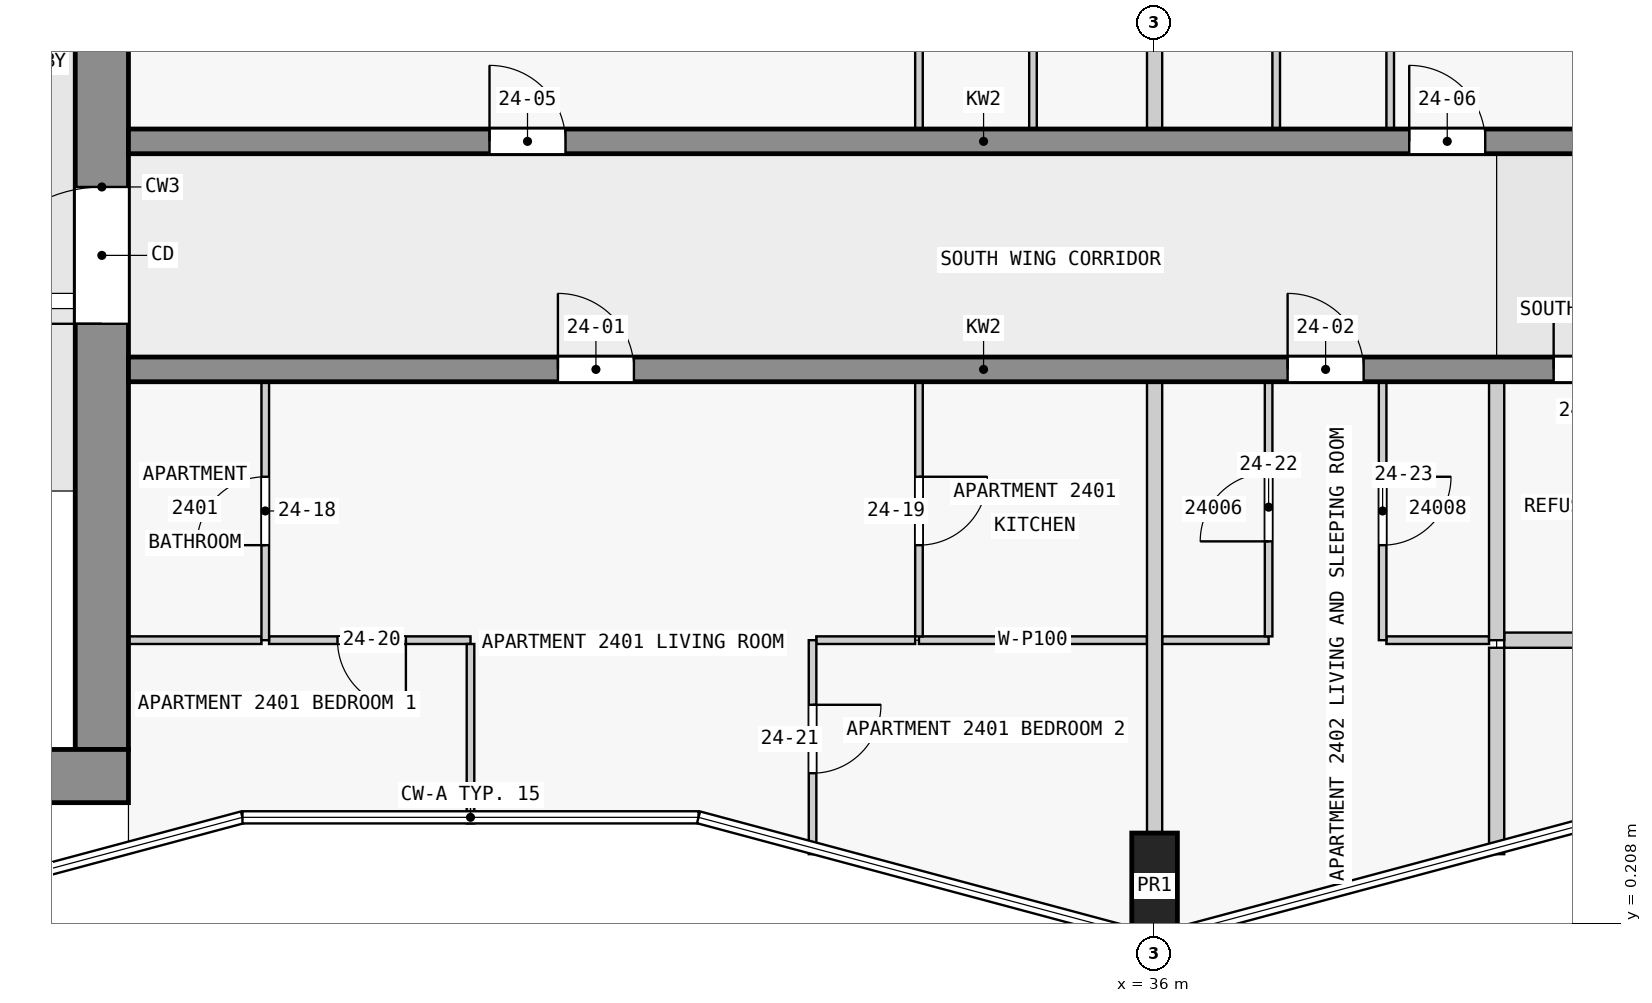
"""IFC4 building model, lengths in metres.
Left out: names, types, materials, properties, quantities, classifications, styles, units other than length and angle.
Written with IfcOpenShell. Run it as: python <this file> out.ifc"""

import sys

from ifc_helpers import new_model, si_unit, direction, frame, frame_2d, origin, origin_2d, place, context, subcontext, project, spatial, rectangle, extrude, element, fill, save


model = new_model("IFC4")
c1 = context("Model", 3, precision=1e-05, world=origin(), true_north=direction((0.0, 1.0)))
c2 = subcontext(c1, "Body", "Model", "MODEL_VIEW")
j1 = project(units=[si_unit("LENGTHUNIT", "METRE"), si_unit("PLANEANGLEUNIT", "RADIAN")], contexts=[c1])
p1 = place(None, origin())
s1 = spatial("IfcSite", under=j1, at=p1, CompositionType="ELEMENT")
p2 = place(p1, origin())
s2 = spatial("IfcBuilding", under=s1, at=p2, CompositionType="ELEMENT")
p3 = place(p2, frame((0.0, 0.0, 95.8)))
s3 = spatial("IfcBuildingStorey", under=s2, at=p3, CompositionType="ELEMENT", Elevation=95.8)
p4 = place(p3, frame((36.0, 0.7, 0.0), z_axis=(0.0, 0.0, 1.0), x_axis=(1.0, 0.0, 0.0)))
e1 = element("IfcColumn", 1, at=p4, inside=s3, PredefinedType="COLUMN", context=c2, shape_type="SweptSolid", body=[
    extrude(rectangle(XDim=0.6, YDim=1.4, at=origin_2d()), origin(), (0.0, 0.0, 1.0), 3.5),
])
p5 = place(p3, frame((1.6, 2.15, 0.0), z_axis=(0.0, 0.0, 1.0), x_axis=(1.0, 0.0, 0.0)))
e2 = element("IfcWall", 2, at=p5, inside=s3, PredefinedType="SHEAR", context=c2, shape_type="SweptSolid", body=[
    extrude(rectangle(XDim=20.9, YDim=0.7, at=frame_2d((10.45, 0.0))), origin(), (0.0, 0.0, 1.0), 3.25),
])
p6 = place(p3, frame((22.15, 2.5, 0.0), z_axis=(0.0, 0.0, 1.0), x_axis=(0.0, 1.0, 0.0)))
e3 = element("IfcWall", 3, at=p6, inside=s3, PredefinedType="SHEAR", context=c2, shape_type="SweptSolid", body=[
    extrude(rectangle(XDim=14.8, YDim=0.7, at=frame_2d((7.4, 0.0))), origin(), (0.0, 0.0, 1.0), 3.25),
])
p7 = place(p6, frame((5.6, 0.0, 0.0)))
e4 = element("IfcOpeningElement", 4, at=p7, cuts=e3, PredefinedType="OPENING", context=c2, shape_type="SweptSolid", body=[
    extrude(rectangle(XDim=1.8, YDim=2.1, at=frame_2d((0.9, 1.05))), frame((0.0, 0.36, 0.0), z_axis=(0.0, -1.0, 0.0), x_axis=(1.0, 0.0, 0.0)), (0.0, 0.0, 1.0), 0.72),
])
p8 = place(p3, frame((22.5, 7.5, 0.0), z_axis=(0.0, 0.0, 1.0), x_axis=(1.0, 0.0, 0.0)))
e5 = element("IfcWall", 5, at=p8, inside=s3, PredefinedType="SHEAR", context=c2, shape_type="SweptSolid", body=[
    extrude(rectangle(XDim=22.5, YDim=0.325, at=frame_2d((11.25, 0.0))), origin(), (0.0, 0.0, 1.0), 3.25),
])
p9 = place(p8, frame((5.65, 0.0, 0.0)))
e6 = element("IfcOpeningElement", 6, at=p9, cuts=e5, PredefinedType="OPENING", context=c2, shape_type="SweptSolid", body=[
    extrude(rectangle(XDim=1.0, YDim=2.1, at=frame_2d((0.5, 1.05))), frame((0.0, 0.172, 0.0), z_axis=(0.0, -1.0, 0.0), x_axis=(1.0, 0.0, 0.0)), (0.0, 0.0, 1.0), 0.345),
])
p10 = place(p8, frame((15.25, 0.0, 0.0)))
e7 = element("IfcOpeningElement", 7, at=p10, cuts=e5, PredefinedType="OPENING", context=c2, shape_type="SweptSolid", body=[
    extrude(rectangle(XDim=1.0, YDim=2.1, at=frame_2d((0.5, 1.05))), frame((0.0, 0.172, 0.0), z_axis=(0.0, -1.0, 0.0), x_axis=(1.0, 0.0, 0.0)), (0.0, 0.0, 1.0), 0.345),
])
p11 = place(p8, frame((18.75, 0.0, 0.0)))
e8 = element("IfcOpeningElement", 8, at=p11, cuts=e5, PredefinedType="OPENING", context=c2, shape_type="SweptSolid", body=[
    extrude(rectangle(XDim=0.9, YDim=2.1, at=frame_2d((0.45, 1.05))), frame((0.0, 0.172, 0.0), z_axis=(0.0, -1.0, 0.0), x_axis=(1.0, 0.0, 0.0)), (0.0, 0.0, 1.0), 0.345),
])
p12 = place(p8, frame((20.95, 0.0, 0.0)))
e9 = element("IfcOpeningElement", 9, at=p12, cuts=e5, PredefinedType="OPENING", context=c2, shape_type="SweptSolid", body=[
    extrude(rectangle(XDim=1.0, YDim=2.1, at=frame_2d((0.5, 1.05))), frame((0.0, 0.172, 0.0), z_axis=(0.0, -1.0, 0.0), x_axis=(1.0, 0.0, 0.0)), (0.0, 0.0, 1.0), 0.345),
])
p13 = place(p3, frame((22.5, 10.5, 0.0), z_axis=(0.0, 0.0, 1.0), x_axis=(1.0, 0.0, 0.0)))
e10 = element("IfcWall", 10, at=p13, inside=s3, PredefinedType="SHEAR", context=c2, shape_type="SweptSolid", body=[
    extrude(rectangle(XDim=22.5, YDim=0.325, at=frame_2d((11.25, 0.0))), origin(), (0.0, 0.0, 1.0), 3.25),
])
p14 = place(p13, frame((4.75, 0.0, 0.0)))
e11 = element("IfcOpeningElement", 11, at=p14, cuts=e10, PredefinedType="OPENING", context=c2, shape_type="SweptSolid", body=[
    extrude(rectangle(XDim=1.0, YDim=2.1, at=frame_2d((0.5, 1.05))), frame((0.0, 0.172, 0.0), z_axis=(0.0, -1.0, 0.0), x_axis=(1.0, 0.0, 0.0)), (0.0, 0.0, 1.0), 0.345),
])
p15 = place(p13, frame((16.85, 0.0, 0.0)))
e12 = element("IfcOpeningElement", 12, at=p15, cuts=e10, PredefinedType="OPENING", context=c2, shape_type="SweptSolid", body=[
    extrude(rectangle(XDim=1.0, YDim=2.1, at=frame_2d((0.5, 1.05))), frame((0.0, 0.172, 0.0), z_axis=(0.0, -1.0, 0.0), x_axis=(1.0, 0.0, 0.0)), (0.0, 0.0, 1.0), 0.345),
])
p16 = place(p3, frame((27.0, 3.938, 0.0), z_axis=(0.0, 0.0, 1.0), x_axis=(-1.0, 0.0, 0.0)))
e13 = element("IfcWall", 13, at=p16, inside=s3, PredefinedType="PARTITIONING", context=c2, shape_type="SweptSolid", body=[
    extrude(rectangle(XDim=2.65, YDim=0.1, at=frame_2d((1.325, 0.0))), origin(), (0.0, 0.0, 1.0), 3.25),
])
p17 = place(p16, frame((0.85, 0.0, 0.0)))
e14 = element("IfcOpeningElement", 14, at=p17, cuts=e13, PredefinedType="OPENING", context=c2, shape_type="SweptSolid", body=[
    extrude(rectangle(XDim=0.9, YDim=2.1, at=frame_2d((0.45, 1.05))), frame((0.0, 0.06, 0.0), z_axis=(0.0, -1.0, 0.0), x_axis=(1.0, 0.0, 0.0)), (0.0, 0.0, 1.0), 0.12),
])
p18 = place(p3, frame((32.85, 3.938, 0.0), z_axis=(0.0, 0.0, 1.0), x_axis=(-1.0, 0.0, 0.0)))
e15 = element("IfcWall", 15, at=p18, inside=s3, PredefinedType="PARTITIONING", context=c2, shape_type="SweptSolid", body=[
    extrude(rectangle(XDim=1.3, YDim=0.1, at=frame_2d((0.65, 0.0))), origin(), (0.0, 0.0, 1.0), 3.25),
])
p19 = place(p3, frame((22.5, 3.938, 0.0), z_axis=(0.0, 0.0, 1.0), x_axis=(1.0, 0.0, 0.0)))
e16 = element("IfcWall", 16, at=p19, inside=s3, PredefinedType="PARTITIONING", context=c2, shape_type="SweptSolid", body=[
    extrude(rectangle(XDim=1.75, YDim=0.1, at=frame_2d((0.875, 0.0))), origin(), (0.0, 0.0, 1.0), 3.25),
])
p20 = place(p3, frame((32.9, 3.938, 0.0), z_axis=(0.0, 0.0, 1.0), x_axis=(1.0, 0.0, 0.0)))
e17 = element("IfcWall", 17, at=p20, inside=s3, PredefinedType="PARTITIONING", context=c2, shape_type="SweptSolid", body=[
    extrude(rectangle(XDim=3.0, YDim=0.1, at=frame_2d((1.5, 0.0))), origin(), (0.0, 0.0, 1.0), 3.25),
])
p21 = place(p3, frame((36.1, 3.938, 0.0), z_axis=(0.0, 0.0, 1.0), x_axis=(1.0, 0.0, 0.0)))
e18 = element("IfcWall", 18, at=p21, inside=s3, PredefinedType="PARTITIONING", context=c2, shape_type="SweptSolid", body=[
    extrude(rectangle(XDim=1.4, YDim=0.1, at=frame_2d((0.7, 0.0))), origin(), (0.0, 0.0, 1.0), 3.25),
])
p22 = place(p3, frame((39.05, 3.938, 0.0), z_axis=(0.0, 0.0, 1.0), x_axis=(1.0, 0.0, 0.0)))
e19 = element("IfcWall", 19, at=p22, inside=s3, PredefinedType="PARTITIONING", context=c2, shape_type="SweptSolid", body=[
    extrude(rectangle(XDim=1.35, YDim=0.1, at=frame_2d((0.675, 0.0))), origin(), (0.0, 0.0, 1.0), 3.25),
])
p23 = place(p3, frame((40.6, 3.938, 0.0), z_axis=(0.0, 0.0, 1.0), x_axis=(1.0, 0.0, 0.0)))
e20 = element("IfcWall", 20, at=p23, inside=s3, PredefinedType="PARTITIONING", context=c2, shape_type="SweptSolid", body=[
    extrude(rectangle(XDim=2.2, YDim=0.2, at=frame_2d((1.1, 0.0))), origin(), (0.0, 0.0, 1.0), 3.25),
])
p24 = place(p3, frame((24.3, 3.938, 0.0), z_axis=(0.0, 0.0, 1.0), x_axis=(0.0, 1.0, 0.0)))
e21 = element("IfcWall", 21, at=p24, inside=s3, PredefinedType="PARTITIONING", context=c2, shape_type="SweptSolid", body=[
    extrude(rectangle(XDim=3.4, YDim=0.1, at=frame_2d((1.7, 0.0))), origin(), (0.0, 0.0, 1.0), 3.25),
])
p25 = place(p24, frame((1.25, 0.0, 0.0)))
e22 = element("IfcOpeningElement", 22, at=p25, cuts=e21, PredefinedType="OPENING", context=c2, shape_type="SweptSolid", body=[
    extrude(rectangle(XDim=0.9, YDim=2.1, at=frame_2d((0.45, 1.05))), frame((0.0, 0.06, 0.0), z_axis=(0.0, -1.0, 0.0), x_axis=(1.0, 0.0, 0.0)), (0.0, 0.0, 1.0), 0.12),
])
p26 = place(p3, frame((27.0, 1.527, 0.0), z_axis=(0.0, 0.0, 1.0), x_axis=(0.0, 1.0, 0.0)))
e23 = element("IfcWall", 23, at=p26, inside=s3, PredefinedType="PARTITIONING", context=c2, shape_type="SweptSolid", body=[
    extrude(rectangle(XDim=2.361, YDim=0.1, at=frame_2d((1.18, 0.0))), origin(), (0.0, 0.0, 1.0), 3.25),
])
p27 = place(p3, frame((31.5, 3.938, 0.0), z_axis=(0.0, 0.0, 1.0), x_axis=(0.0, -1.0, 0.0)))
e24 = element("IfcWall", 24, at=p27, inside=s3, PredefinedType="PARTITIONING", context=c2, shape_type="SweptSolid", body=[
    extrude(rectangle(XDim=2.815, YDim=0.1, at=frame_2d((1.408, 0.0))), origin(), (0.0, 0.0, 1.0), 3.25),
])
p28 = place(p27, frame((0.85, 0.0, 0.0)))
e25 = element("IfcOpeningElement", 25, at=p28, cuts=e24, PredefinedType="OPENING", context=c2, shape_type="SweptSolid", body=[
    extrude(rectangle(XDim=0.9, YDim=2.1, at=frame_2d((0.45, 1.05))), frame((0.0, 0.06, 0.0), z_axis=(0.0, -1.0, 0.0), x_axis=(1.0, 0.0, 0.0)), (0.0, 0.0, 1.0), 0.12),
])
p29 = place(p3, frame((32.9, 7.337, 0.0), z_axis=(0.0, 0.0, 1.0), x_axis=(0.0, -1.0, 0.0)))
e26 = element("IfcWall", 26, at=p29, inside=s3, PredefinedType="PARTITIONING", context=c2, shape_type="SweptSolid", body=[
    extrude(rectangle(XDim=3.35, YDim=0.1, at=frame_2d((1.675, 0.0))), origin(), (0.0, 0.0, 1.0), 3.25),
])
p30 = place(p29, frame((1.25, 0.0, 0.0)))
e27 = element("IfcOpeningElement", 27, at=p30, cuts=e26, PredefinedType="OPENING", context=c2, shape_type="SweptSolid", body=[
    extrude(rectangle(XDim=0.9, YDim=2.1, at=frame_2d((0.45, 1.05))), frame((0.0, 0.06, 0.0), z_axis=(0.0, -1.0, 0.0), x_axis=(1.0, 0.0, 0.0)), (0.0, 0.0, 1.0), 0.12),
])
p31 = place(p3, frame((32.9, 14.012, 0.0), z_axis=(0.0, 0.0, 1.0), x_axis=(0.0, -1.0, 0.0)))
e28 = element("IfcWall", 28, at=p31, inside=s3, PredefinedType="PARTITIONING", context=c2, shape_type="SweptSolid", body=[
    extrude(rectangle(XDim=3.35, YDim=0.1, at=frame_2d((1.675, 0.0))), origin(), (0.0, 0.0, 1.0), 3.25),
])
p32 = place(p31, frame((1.25, 0.0, 0.0)))
e29 = element("IfcOpeningElement", 29, at=p32, cuts=e28, PredefinedType="OPENING", context=c2, shape_type="SweptSolid", body=[
    extrude(rectangle(XDim=0.9, YDim=2.1, at=frame_2d((0.45, 1.05))), frame((0.0, 0.06, 0.0), z_axis=(0.0, -1.0, 0.0), x_axis=(1.0, 0.0, 0.0)), (0.0, 0.0, 1.0), 0.12),
])
p33 = place(p3, frame((34.4, 10.663, 0.0), z_axis=(0.0, 0.0, 1.0), x_axis=(0.0, 1.0, 0.0)))
e30 = element("IfcWall", 30, at=p33, inside=s3, PredefinedType="PARTITIONING", context=c2, shape_type="SweptSolid", body=[
    extrude(rectangle(XDim=3.35, YDim=0.1, at=frame_2d((1.675, 0.0))), origin(), (0.0, 0.0, 1.0), 3.25),
])
p34 = place(p3, frame((36.0, 1.4, 0.0), z_axis=(0.0, 0.0, 1.0), x_axis=(0.0, 1.0, 0.0)))
e31 = element("IfcWall", 31, at=p34, inside=s3, PredefinedType="PARTITIONING", context=c2, shape_type="SweptSolid", body=[
    extrude(rectangle(XDim=5.938, YDim=0.2, at=frame_2d((2.969, 0.0))), origin(), (0.0, 0.0, 1.0), 3.25),
])
p35 = place(p3, frame((36.0, 10.663, 0.0), z_axis=(0.0, 0.0, 1.0), x_axis=(0.0, 1.0, 0.0)))
e32 = element("IfcWall", 32, at=p35, inside=s3, PredefinedType="PARTITIONING", context=c2, shape_type="SweptSolid", body=[
    extrude(rectangle(XDim=3.4, YDim=0.2, at=frame_2d((1.7, 0.0))), origin(), (0.0, 0.0, 1.0), 3.25),
])
p36 = place(p3, frame((37.5, 3.988, 0.0), z_axis=(0.0, 0.0, 1.0), x_axis=(0.0, 1.0, 0.0)))
e33 = element("IfcWall", 33, at=p36, inside=s3, PredefinedType="PARTITIONING", context=c2, shape_type="SweptSolid", body=[
    extrude(rectangle(XDim=3.35, YDim=0.1, at=frame_2d((1.675, 0.0))), origin(), (0.0, 0.0, 1.0), 3.25),
])
p37 = place(p36, frame((1.25, 0.0, 0.0)))
e34 = element("IfcOpeningElement", 34, at=p37, cuts=e33, PredefinedType="OPENING", context=c2, shape_type="SweptSolid", body=[
    extrude(rectangle(XDim=0.9, YDim=2.1, at=frame_2d((0.45, 1.05))), frame((0.0, 0.06, 0.0), z_axis=(0.0, -1.0, 0.0), x_axis=(1.0, 0.0, 0.0)), (0.0, 0.0, 1.0), 0.12),
])
p38 = place(p3, frame((37.6, 10.663, 0.0), z_axis=(0.0, 0.0, 1.0), x_axis=(0.0, 1.0, 0.0)))
e35 = element("IfcWall", 35, at=p38, inside=s3, PredefinedType="PARTITIONING", context=c2, shape_type="SweptSolid", body=[
    extrude(rectangle(XDim=3.35, YDim=0.1, at=frame_2d((1.675, 0.0))), origin(), (0.0, 0.0, 1.0), 3.25),
])
p39 = place(p3, frame((39.0, 7.337, 0.0), z_axis=(0.0, 0.0, 1.0), x_axis=(0.0, -1.0, 0.0)))
e36 = element("IfcWall", 36, at=p39, inside=s3, PredefinedType="PARTITIONING", context=c2, shape_type="SweptSolid", body=[
    extrude(rectangle(XDim=3.4, YDim=0.1, at=frame_2d((1.7, 0.0))), origin(), (0.0, 0.0, 1.0), 3.25),
])
p40 = place(p39, frame((1.25, 0.0, 0.0)))
e37 = element("IfcOpeningElement", 37, at=p40, cuts=e36, PredefinedType="OPENING", context=c2, shape_type="SweptSolid", body=[
    extrude(rectangle(XDim=0.9, YDim=2.1, at=frame_2d((0.45, 1.05))), frame((0.0, 0.06, 0.0), z_axis=(0.0, -1.0, 0.0), x_axis=(1.0, 0.0, 0.0)), (0.0, 0.0, 1.0), 0.12),
])
p41 = place(p3, frame((39.1, 10.663, 0.0), z_axis=(0.0, 0.0, 1.0), x_axis=(0.0, 1.0, 0.0)))
e38 = element("IfcWall", 38, at=p41, inside=s3, PredefinedType="PARTITIONING", context=c2, shape_type="SweptSolid", body=[
    extrude(rectangle(XDim=3.35, YDim=0.1, at=frame_2d((1.675, 0.0))), origin(), (0.0, 0.0, 1.0), 3.25),
])
p42 = place(p41, frame((1.25, 0.0, 0.0)))
e39 = element("IfcOpeningElement", 39, at=p42, cuts=e38, PredefinedType="OPENING", context=c2, shape_type="SweptSolid", body=[
    extrude(rectangle(XDim=0.9, YDim=2.1, at=frame_2d((0.45, 1.05))), frame((0.0, 0.06, 0.0), z_axis=(0.0, -1.0, 0.0), x_axis=(1.0, 0.0, 0.0)), (0.0, 0.0, 1.0), 0.12),
])
p43 = place(p3, frame((40.5, 3.837, 0.0), z_axis=(0.0, 0.0, 1.0), x_axis=(0.0, -1.0, 0.0)))
e40 = element("IfcWall", 40, at=p43, inside=s3, PredefinedType="PARTITIONING", context=c2, shape_type="SweptSolid", body=[
    extrude(rectangle(XDim=2.715, YDim=0.2, at=frame_2d((1.357, 0.0))), origin(), (0.0, 0.0, 1.0), 3.25),
])
p44 = place(p3, frame((40.5, 3.938, 0.0), z_axis=(0.0, 0.0, 1.0), x_axis=(0.0, 1.0, 0.0)))
e41 = element("IfcWall", 41, at=p44, inside=s3, PredefinedType="PARTITIONING", context=c2, shape_type="SweptSolid", body=[
    extrude(rectangle(XDim=3.4, YDim=0.2, at=frame_2d((1.7, 0.0))), origin(), (0.0, 0.0, 1.0), 3.25),
])
p45 = place(p7, origin())
e42 = element("IfcDoor", 42, at=p45, inside=s3, OperationType="DOUBLE_DOOR_SINGLE_SWING", PredefinedType="DOOR", context=c2, shape_type="SweptSolid", body=[
    extrude(rectangle(XDim=1.8, YDim=2.1, at=frame_2d((0.9, 1.05))), frame((0.0, 0.025, 0.0), z_axis=(0.0, -1.0, 0.0), x_axis=(1.0, 0.0, 0.0)), (0.0, 0.0, 1.0), 0.05),
])
fill(e4, e42)
p46 = place(p9, origin())
e43 = element("IfcDoor", 43, at=p46, inside=s3, OperationType="SINGLE_SWING_LEFT", PredefinedType="DOOR", context=c2, shape_type="SweptSolid", body=[
    extrude(rectangle(XDim=1.0, YDim=2.1, at=frame_2d((0.5, 1.05))), frame((0.0, 0.025, 0.0), z_axis=(0.0, -1.0, 0.0), x_axis=(1.0, 0.0, 0.0)), (0.0, 0.0, 1.0), 0.05),
])
fill(e6, e43)
p47 = place(p10, origin())
e44 = element("IfcDoor", 44, at=p47, inside=s3, OperationType="SINGLE_SWING_RIGHT", PredefinedType="DOOR", context=c2, shape_type="SweptSolid", body=[
    extrude(rectangle(XDim=1.0, YDim=2.1, at=frame_2d((0.5, 1.05))), frame((0.0, 0.025, 0.0), z_axis=(0.0, -1.0, 0.0), x_axis=(1.0, 0.0, 0.0)), (0.0, 0.0, 1.0), 0.05),
])
fill(e7, e44)
p48 = place(p11, origin())
e45 = element("IfcDoor", 45, at=p48, inside=s3, OperationType="SINGLE_SWING_RIGHT", PredefinedType="DOOR", context=c2, shape_type="SweptSolid", body=[
    extrude(rectangle(XDim=0.9, YDim=2.1, at=frame_2d((0.45, 1.05))), frame((0.0, 0.025, 0.0), z_axis=(0.0, -1.0, 0.0), x_axis=(1.0, 0.0, 0.0)), (0.0, 0.0, 1.0), 0.05),
])
fill(e8, e45)
p49 = place(p14, origin())
e46 = element("IfcDoor", 46, at=p49, inside=s3, OperationType="SINGLE_SWING_LEFT", PredefinedType="DOOR", context=c2, shape_type="SweptSolid", body=[
    extrude(rectangle(XDim=1.0, YDim=2.1, at=frame_2d((0.5, 1.05))), frame((0.0, 0.025, 0.0), z_axis=(0.0, -1.0, 0.0), x_axis=(1.0, 0.0, 0.0)), (0.0, 0.0, 1.0), 0.05),
])
fill(e11, e46)
p50 = place(p15, origin())
e47 = element("IfcDoor", 47, at=p50, inside=s3, OperationType="SINGLE_SWING_RIGHT", PredefinedType="DOOR", context=c2, shape_type="SweptSolid", body=[
    extrude(rectangle(XDim=1.0, YDim=2.1, at=frame_2d((0.5, 1.05))), frame((0.0, 0.025, 0.0), z_axis=(0.0, -1.0, 0.0), x_axis=(1.0, 0.0, 0.0)), (0.0, 0.0, 1.0), 0.05),
])
fill(e12, e47)
p51 = place(p25, origin())
e48 = element("IfcDoor", 48, at=p51, inside=s3, OperationType="SINGLE_SWING_LEFT", PredefinedType="DOOR", context=c2, shape_type="SweptSolid", body=[
    extrude(rectangle(XDim=0.9, YDim=2.1, at=frame_2d((0.45, 1.05))), frame((0.0, 0.025, 0.0), z_axis=(0.0, -1.0, 0.0), x_axis=(1.0, 0.0, 0.0)), (0.0, 0.0, 1.0), 0.05),
])
fill(e22, e48)
p52 = place(p30, origin())
e49 = element("IfcDoor", 49, at=p52, inside=s3, OperationType="SINGLE_SWING_RIGHT", PredefinedType="DOOR", context=c2, shape_type="SweptSolid", body=[
    extrude(rectangle(XDim=0.9, YDim=2.1, at=frame_2d((0.45, 1.05))), frame((0.0, 0.025, 0.0), z_axis=(0.0, -1.0, 0.0), x_axis=(1.0, 0.0, 0.0)), (0.0, 0.0, 1.0), 0.05),
])
fill(e27, e49)
p53 = place(p17, origin())
e50 = element("IfcDoor", 50, at=p53, inside=s3, OperationType="SINGLE_SWING_LEFT", PredefinedType="DOOR", context=c2, shape_type="SweptSolid", body=[
    extrude(rectangle(XDim=0.9, YDim=2.1, at=frame_2d((0.45, 1.05))), frame((0.0, 0.025, 0.0), z_axis=(0.0, -1.0, 0.0), x_axis=(1.0, 0.0, 0.0)), (0.0, 0.0, 1.0), 0.05),
])
fill(e14, e50)
p54 = place(p28, origin())
e51 = element("IfcDoor", 51, at=p54, inside=s3, OperationType="SINGLE_SWING_LEFT", PredefinedType="DOOR", context=c2, shape_type="SweptSolid", body=[
    extrude(rectangle(XDim=0.9, YDim=2.1, at=frame_2d((0.45, 1.05))), frame((0.0, 0.025, 0.0), z_axis=(0.0, -1.0, 0.0), x_axis=(1.0, 0.0, 0.0)), (0.0, 0.0, 1.0), 0.05),
])
fill(e25, e51)
p55 = place(p37, origin())
e52 = element("IfcDoor", 52, at=p55, inside=s3, OperationType="SINGLE_SWING_RIGHT", PredefinedType="DOOR", context=c2, shape_type="SweptSolid", body=[
    extrude(rectangle(XDim=0.9, YDim=2.1, at=frame_2d((0.45, 1.05))), frame((0.0, 0.025, 0.0), z_axis=(0.0, -1.0, 0.0), x_axis=(1.0, 0.0, 0.0)), (0.0, 0.0, 1.0), 0.05),
])
fill(e34, e52)
p56 = place(p40, origin())
e53 = element("IfcDoor", 53, at=p56, inside=s3, OperationType="SINGLE_SWING_LEFT", PredefinedType="DOOR", context=c2, shape_type="SweptSolid", body=[
    extrude(rectangle(XDim=0.9, YDim=2.1, at=frame_2d((0.45, 1.05))), frame((0.0, 0.025, 0.0), z_axis=(0.0, -1.0, 0.0), x_axis=(1.0, 0.0, 0.0)), (0.0, 0.0, 1.0), 0.05),
])
fill(e37, e53)
save(model, sys.argv[1])
